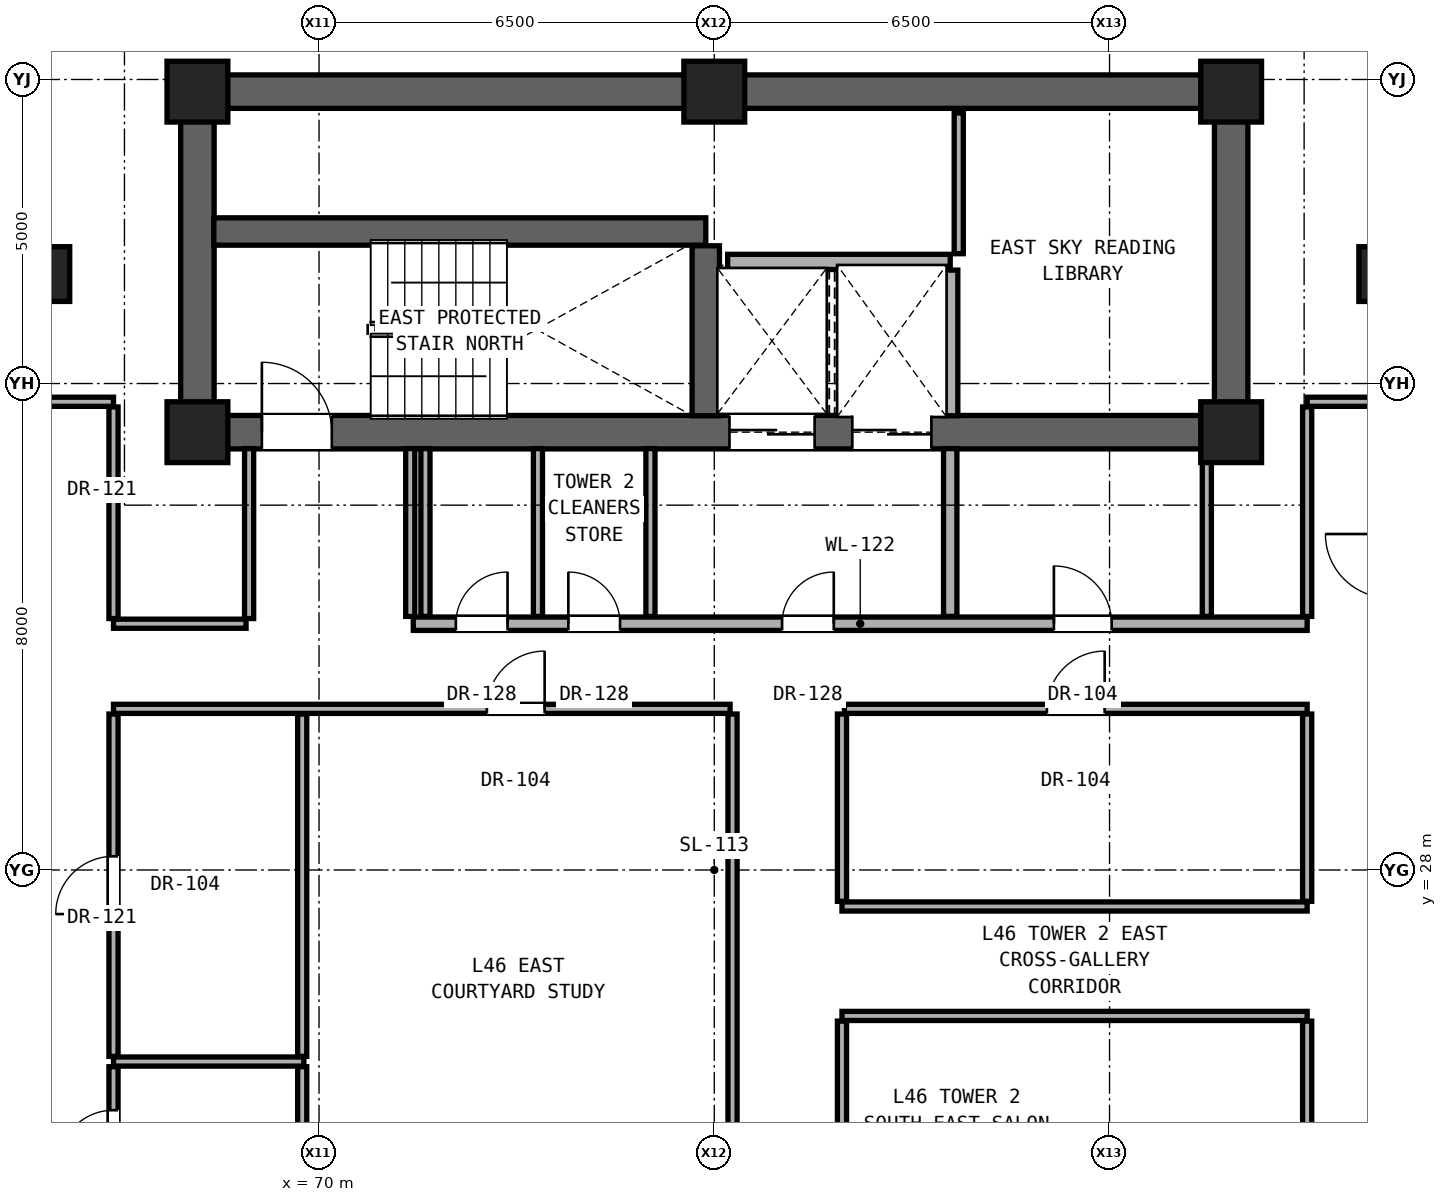
"""IFC4 building model, lengths in metres.
Left out: names, types, materials, properties, quantities, classifications, styles, units other than length and angle.
Written with IfcOpenShell. Run it as: python <this file> out.ifc"""

import sys

from ifc_helpers import new_model, si_unit, direction, frame, frame_2d, origin, origin_2d, place, context, subcontext, project, spatial, rectangle, extrude, element, fill, save


model = new_model("IFC4")
c1 = context("Model", 3, precision=1e-05, world=origin(), true_north=direction((0.0, 1.0)))
c2 = subcontext(c1, "Body", "Model", "MODEL_VIEW")
j1 = project(units=[si_unit("LENGTHUNIT", "METRE"), si_unit("PLANEANGLEUNIT", "RADIAN")], contexts=[c1])
p1 = place(None, origin())
s1 = spatial("IfcSite", under=j1, at=p1, CompositionType="ELEMENT")
p2 = place(p1, origin())
s2 = spatial("IfcBuilding", under=s1, at=p2, CompositionType="ELEMENT")
p3 = place(p2, frame((0.0, 0.0, 164.15)))
s3 = spatial("IfcBuildingStorey", under=s2, at=p3, CompositionType="ELEMENT", Elevation=164.15)
for number, where, z_axis, x_axis in (
    (1, (68.0, 35.2, 0.0), (0.0, 0.0, 1.0), (1.0, 0.0, 0.0)),
    (2, (85.0, 35.2, 0.0), (0.0, 0.0, 1.0), (1.0, 0.0, 0.0)),
    (3, (68.0, 40.8, 0.0), (0.0, 0.0, 1.0), (1.0, 0.0, 0.0)),
    (4, (76.5, 40.8, 0.0), (0.0, 0.0, 1.0), (1.0, 0.0, 0.0)),
    (5, (85.0, 40.8, 0.0), (0.0, 0.0, 1.0), (1.0, 0.0, 0.0)),
):
    element("IfcColumn", number, at=place(p3, frame(where, z_axis=z_axis, x_axis=x_axis)), inside=s3, PredefinedType="COLUMN", context=c2, shape_type="SweptSolid", body=[
        extrude(rectangle(XDim=1.0, YDim=1.0, at=origin_2d()), origin(), (0.0, 0.0, 1.0), 3.25),
    ])
for number, where, z_axis, x_axis in (
    (6, (65.6, 37.8, 0.0), (0.0, 0.0, 1.0), (1.0, 0.0, 0.0)),
    (7, (87.4, 37.8, 0.0), (0.0, 0.0, 1.0), (1.0, 0.0, 0.0)),
):
    element("IfcColumn", number, at=place(p3, frame(where, z_axis=z_axis, x_axis=x_axis)), inside=s3, PredefinedType="PILASTER", context=c2, shape_type="SweptSolid", body=[
        extrude(rectangle(XDim=0.6, YDim=0.9, at=origin_2d()), origin(), (0.0, 0.0, 1.0), 3.25),
    ])
p4 = place(p3, frame((68.0, 40.8, 0.0), z_axis=(0.0, 0.0, 1.0), x_axis=(1.0, 0.0, 0.0)))
e8 = element("IfcWall", 8, at=p4, inside=s3, PredefinedType="SHEAR", context=c2, shape_type="SweptSolid", body=[
    extrude(rectangle(XDim=17.0, YDim=0.55, at=frame_2d((8.5, 0.0))), origin(), (0.0, 0.0, 1.0), 3.05),
])
for number, where, z_axis, x_axis in (
    (9, (68.0, 35.2, 0.0), (0.0, 0.0, 1.0), (0.0, 1.0, 0.0)),
    (10, (85.0, 35.2, 0.0), (0.0, 0.0, 1.0), (0.0, 1.0, 0.0)),
):
    element("IfcWall", number, at=place(p3, frame(where, z_axis=z_axis, x_axis=x_axis)), inside=s3, PredefinedType="SHEAR", context=c2, shape_type="SweptSolid", body=[
        extrude(rectangle(XDim=5.6, YDim=0.55, at=frame_2d((2.8, 0.0))), origin(), (0.0, 0.0, 1.0), 3.05),
    ])
p5 = place(p3, frame((68.0, 35.2, 0.0), z_axis=(0.0, 0.0, 1.0), x_axis=(1.0, 0.0, 0.0)))
e11 = element("IfcWall", 11, at=p5, inside=s3, PredefinedType="SHEAR", context=c2, shape_type="SweptSolid", body=[
    extrude(rectangle(XDim=17.0, YDim=0.55, at=frame_2d((8.5, 0.0))), origin(), (0.0, 0.0, 1.0), 3.05),
])
p6 = place(p5, frame((1.06, 0.0, 0.0)))
e12 = element("IfcOpeningElement", 12, at=p6, cuts=e11, PredefinedType="OPENING", context=c2, shape_type="SweptSolid", body=[
    extrude(rectangle(XDim=1.15, YDim=2.2, at=frame_2d((0.575, 1.1))), frame((0.0, 0.285, 0.0), z_axis=(0.0, -1.0, 0.0), x_axis=(1.0, 0.0, 0.0)), (0.0, 0.0, 1.0), 0.57),
])
p7 = place(p5, frame((8.75, 0.0, 0.0)))
e13 = element("IfcOpeningElement", 13, at=p7, cuts=e11, PredefinedType="OPENING", context=c2, shape_type="SweptSolid", body=[
    extrude(rectangle(XDim=1.4, YDim=2.35, at=frame_2d((0.7, 1.175))), frame((0.0, 0.285, 0.0), z_axis=(0.0, -1.0, 0.0), x_axis=(1.0, 0.0, 0.0)), (0.0, 0.0, 1.0), 0.57),
])
p8 = place(p5, frame((10.77, 0.0, 0.0)))
e14 = element("IfcOpeningElement", 14, at=p8, cuts=e11, PredefinedType="OPENING", context=c2, shape_type="SweptSolid", body=[
    extrude(rectangle(XDim=1.3, YDim=2.3, at=frame_2d((0.65, 1.15))), frame((0.0, 0.285, 0.0), z_axis=(0.0, -1.0, 0.0), x_axis=(1.0, 0.0, 0.0)), (0.0, 0.0, 1.0), 0.57),
])
p9 = place(p3, frame((66.62, 24.85, 0.0), z_axis=(0.0, 0.0, 1.0), x_axis=(1.0, 0.0, 0.0)))
e15 = element("IfcWall", 15, at=p9, inside=s3, PredefinedType="PARTITIONING", context=c2, shape_type="SweptSolid", body=[
    extrude(rectangle(XDim=3.13, YDim=0.15, at=frame_2d((1.565, 0.0))), origin(), (0.0, 0.0, 1.0), 2.186),
])
for number, where, z_axis, x_axis in (
    (16, (78.6, 25.6, 0.0), (0.0, 0.0, 1.0), (1.0, 0.0, 0.0)),
    (17, (78.6, 27.4, 0.0), (0.0, 0.0, 1.0), (1.0, 0.0, 0.0)),
):
    element("IfcWall", number, at=place(p3, frame(where, z_axis=z_axis, x_axis=x_axis)), inside=s3, PredefinedType="PARTITIONING", context=c2, shape_type="SweptSolid", body=[
        extrude(rectangle(XDim=7.65, YDim=0.15, at=frame_2d((3.825, 0.0))), origin(), (0.0, 0.0, 1.0), 2.186),
    ])
p10 = place(p3, frame((66.62, 30.65, 0.0), z_axis=(0.0, 0.0, 1.0), x_axis=(1.0, 0.0, 0.0)))
e18 = element("IfcWall", 18, at=p10, inside=s3, PredefinedType="PARTITIONING", context=c2, shape_type="SweptSolid", body=[
    extrude(rectangle(XDim=10.14, YDim=0.15, at=frame_2d((5.07, 0.0))), origin(), (0.0, 0.0, 1.0), 2.186),
])
p11 = place(p10, frame((6.14, 0.0, 0.0)))
e19 = element("IfcOpeningElement", 19, at=p11, cuts=e18, PredefinedType="OPENING", context=c2, shape_type="SweptSolid", body=[
    extrude(rectangle(XDim=0.95, YDim=2.15, at=frame_2d((0.475, 1.075))), frame((0.0, 0.085, 0.0), z_axis=(0.0, -1.0, 0.0), x_axis=(1.0, 0.0, 0.0)), (0.0, 0.0, 1.0), 0.17),
])
p12 = place(p3, frame((78.64, 30.65, 0.0), z_axis=(0.0, 0.0, 1.0), x_axis=(1.0, 0.0, 0.0)))
e20 = element("IfcWall", 20, at=p12, inside=s3, PredefinedType="PARTITIONING", context=c2, shape_type="SweptSolid", body=[
    extrude(rectangle(XDim=7.61, YDim=0.15, at=frame_2d((3.805, 0.0))), origin(), (0.0, 0.0, 1.0), 2.186),
])
p13 = place(p12, frame((3.33, 0.0, 0.0)))
e21 = element("IfcOpeningElement", 21, at=p13, cuts=e20, PredefinedType="OPENING", context=c2, shape_type="SweptSolid", body=[
    extrude(rectangle(XDim=0.95, YDim=2.15, at=frame_2d((0.475, 1.075))), frame((0.0, 0.085, 0.0), z_axis=(0.0, -1.0, 0.0), x_axis=(1.0, 0.0, 0.0)), (0.0, 0.0, 1.0), 0.17),
])
p14 = place(p3, frame((66.62, 32.05, 0.0), z_axis=(0.0, 0.0, 1.0), x_axis=(1.0, 0.0, 0.0)))
e22 = element("IfcWall", 22, at=p14, inside=s3, PredefinedType="PARTITIONING", context=c2, shape_type="SweptSolid", body=[
    extrude(rectangle(XDim=2.18, YDim=0.15, at=frame_2d((1.09, 0.0))), origin(), (0.0, 0.0, 1.0), 2.186),
])
p15 = place(p3, frame((71.55, 32.05, 0.0), z_axis=(0.0, 0.0, 1.0), x_axis=(1.0, 0.0, 0.0)))
e23 = element("IfcWall", 23, at=p15, inside=s3, PredefinedType="SOLIDWALL", context=c2, shape_type="SweptSolid", body=[
    extrude(rectangle(XDim=14.7, YDim=0.22, at=frame_2d((7.35, 0.0))), origin(), (0.0, 0.0, 1.0), 2.186),
])
p16 = place(p15, frame((6.065, 0.0, 0.0)))
e24 = element("IfcOpeningElement", 24, at=p16, cuts=e23, PredefinedType="OPENING", context=c2, shape_type="SweptSolid", body=[
    extrude(rectangle(XDim=0.85, YDim=2.01, at=frame_2d((0.425, 1.005))), frame((0.0, 0.12, 0.0), z_axis=(0.0, -1.0, 0.0), x_axis=(1.0, 0.0, 0.0)), (0.0, 0.0, 1.0), 0.24),
])
p17 = place(p15, frame((10.535, 0.0, 0.0)))
e25 = element("IfcOpeningElement", 25, at=p17, cuts=e23, PredefinedType="OPENING", context=c2, shape_type="SweptSolid", body=[
    extrude(rectangle(XDim=0.95, YDim=2.15, at=frame_2d((0.475, 1.075))), frame((0.0, 0.12, 0.0), z_axis=(0.0, -1.0, 0.0), x_axis=(1.0, 0.0, 0.0)), (0.0, 0.0, 1.0), 0.24),
])
p18 = place(p15, frame((0.7, 0.0, 0.0)))
e26 = element("IfcOpeningElement", 26, at=p18, cuts=e23, PredefinedType="OPENING", context=c2, shape_type="SweptSolid", body=[
    extrude(rectangle(XDim=0.85, YDim=2.01, at=frame_2d((0.425, 1.005))), frame((0.0, 0.12, 0.0), z_axis=(0.0, -1.0, 0.0), x_axis=(1.0, 0.0, 0.0)), (0.0, 0.0, 1.0), 0.24),
])
p19 = place(p15, frame((2.55, 0.0, 0.0)))
e27 = element("IfcOpeningElement", 27, at=p19, cuts=e23, PredefinedType="OPENING", context=c2, shape_type="SweptSolid", body=[
    extrude(rectangle(XDim=0.85, YDim=2.01, at=frame_2d((0.425, 1.005))), frame((0.0, 0.12, 0.0), z_axis=(0.0, -1.0, 0.0), x_axis=(1.0, 0.0, 0.0)), (0.0, 0.0, 1.0), 0.24),
])
p20 = place(p3, frame((65.25, 35.7, 0.0), z_axis=(0.0, 0.0, 1.0), x_axis=(1.0, 0.0, 0.0)))
e28 = element("IfcWall", 28, at=p20, inside=s3, PredefinedType="PARTITIONING", context=c2, shape_type="SweptSolid", body=[
    extrude(rectangle(XDim=1.37, YDim=0.15, at=frame_2d((0.685, 0.0))), origin(), (0.0, 0.0, 1.0), 3.05),
])
p21 = place(p3, frame((86.25, 35.7, 0.0), z_axis=(0.0, 0.0, 1.0), x_axis=(1.0, 0.0, 0.0)))
e29 = element("IfcWall", 29, at=p21, inside=s3, PredefinedType="PARTITIONING", context=c2, shape_type="SweptSolid", body=[
    extrude(rectangle(XDim=1.35, YDim=0.15, at=frame_2d((0.675, 0.0))), origin(), (0.0, 0.0, 1.0), 3.05),
])
p22 = place(p3, frame((76.72, 38.0, 0.0), z_axis=(0.0, 0.0, 1.0), x_axis=(1.0, 0.0, 0.0)))
e30 = element("IfcWall", 30, at=p22, inside=s3, PredefinedType="SOLIDWALL", context=c2, shape_type="SweptSolid", body=[
    extrude(rectangle(XDim=3.66, YDim=0.25, at=frame_2d((1.83, 0.0))), origin(), (0.0, 0.0, 1.0), 3.05),
])
p23 = place(p3, frame((68.27, 38.5, 0.0), z_axis=(0.0, 0.0, 1.0), x_axis=(1.0, 0.0, 0.0)))
e31 = element("IfcWall", 31, at=p23, inside=s3, PredefinedType="SHEAR", context=c2, shape_type="SweptSolid", body=[
    extrude(rectangle(XDim=8.09, YDim=0.45, at=frame_2d((4.045, 0.0))), origin(), (0.0, 0.0, 1.0), 3.05),
])
p24 = place(p3, frame((66.62, 22.435, 0.0), z_axis=(0.0, 0.0, 1.0), x_axis=(0.0, 1.0, 0.0)))
e32 = element("IfcWall", 32, at=p24, inside=s3, PredefinedType="PARTITIONING", context=c2, shape_type="SweptSolid", body=[
    extrude(rectangle(XDim=2.33, YDim=0.15, at=frame_2d((1.165, 0.0))), origin(), (0.0, 0.0, 1.0), 3.05),
])
p25 = place(p24, frame((0.715, 0.0, 0.0)))
e33 = element("IfcOpeningElement", 33, at=p25, cuts=e32, PredefinedType="OPENING", context=c2, shape_type="SweptSolid", body=[
    extrude(rectangle(XDim=0.9, YDim=2.1, at=frame_2d((0.45, 1.05))), frame((0.0, 0.085, 0.0), z_axis=(0.0, -1.0, 0.0), x_axis=(1.0, 0.0, 0.0)), (0.0, 0.0, 1.0), 0.17),
])
p26 = place(p3, frame((66.62, 24.935, 0.0), z_axis=(0.0, 0.0, 1.0), x_axis=(0.0, 1.0, 0.0)))
e34 = element("IfcWall", 34, at=p26, inside=s3, PredefinedType="PARTITIONING", context=c2, shape_type="SweptSolid", body=[
    extrude(rectangle(XDim=5.63, YDim=0.15, at=frame_2d((2.815, 0.0))), origin(), (0.0, 0.0, 1.0), 2.346),
])
p27 = place(p26, frame((2.34, 0.0, 0.0)))
e35 = element("IfcOpeningElement", 35, at=p27, cuts=e34, PredefinedType="OPENING", context=c2, shape_type="SweptSolid", body=[
    extrude(rectangle(XDim=0.95, YDim=2.15, at=frame_2d((0.475, 1.075))), frame((0.0, 0.085, 0.0), z_axis=(0.0, -1.0, 0.0), x_axis=(1.0, 0.0, 0.0)), (0.0, 0.0, 1.0), 0.17),
])
p28 = place(p3, frame((66.62, 32.135, 0.0), z_axis=(0.0, 0.0, 1.0), x_axis=(0.0, 1.0, 0.0)))
e36 = element("IfcWall", 36, at=p28, inside=s3, PredefinedType="PARTITIONING", context=c2, shape_type="SweptSolid", body=[
    extrude(rectangle(XDim=3.48, YDim=0.15, at=frame_2d((1.74, 0.0))), origin(), (0.0, 0.0, 1.0), 2.442),
])
p29 = place(p3, frame((68.85, 32.135, 0.0), z_axis=(0.0, 0.0, 1.0), x_axis=(0.0, 1.0, 0.0)))
e37 = element("IfcWall", 37, at=p29, inside=s3, PredefinedType="PARTITIONING", context=c2, shape_type="SweptSolid", body=[
    extrude(rectangle(XDim=2.795, YDim=0.15, at=frame_2d((1.397, 0.0))), origin(), (0.0, 0.0, 1.0), 3.05),
])
p30 = place(p3, frame((69.723, 22.435, 0.0), z_axis=(0.0, 0.0, 1.0), x_axis=(0.0, 1.0, 0.0)))
e38 = element("IfcWall", 38, at=p30, inside=s3, PredefinedType="PARTITIONING", context=c2, shape_type="SweptSolid", body=[
    extrude(rectangle(XDim=2.33, YDim=0.15, at=frame_2d((1.165, 0.0))), origin(), (0.0, 0.0, 1.0), 3.05),
])
p31 = place(p3, frame((69.723, 24.935, 0.0), z_axis=(0.0, 0.0, 1.0), x_axis=(0.0, 1.0, 0.0)))
e39 = element("IfcWall", 39, at=p31, inside=s3, PredefinedType="PARTITIONING", context=c2, shape_type="SweptSolid", body=[
    extrude(rectangle(XDim=5.63, YDim=0.15, at=frame_2d((2.815, 0.0))), origin(), (0.0, 0.0, 1.0), 2.186),
])
for number, where, z_axis, x_axis in (
    (40, (71.5, 32.17, 0.0), (0.0, 0.0, 1.0), (0.0, 1.0, 0.0)),
    (41, (71.75, 32.17, 0.0), (0.0, 0.0, 1.0), (0.0, 1.0, 0.0)),
    (42, (73.6, 32.17, 0.0), (0.0, 0.0, 1.0), (0.0, 1.0, 0.0)),
    (43, (75.45, 32.17, 0.0), (0.0, 0.0, 1.0), (0.0, 1.0, 0.0)),
):
    element("IfcWall", number, at=place(p3, frame(where, z_axis=z_axis, x_axis=x_axis)), inside=s3, PredefinedType="PARTITIONING", context=c2, shape_type="SweptSolid", body=[
        extrude(rectangle(XDim=2.76, YDim=0.15, at=frame_2d((1.38, 0.0))), origin(), (0.0, 0.0, 1.0), 3.05),
    ])
p32 = place(p3, frame((76.36, 35.47, 0.0), z_axis=(0.0, 0.0, 1.0), x_axis=(0.0, 1.0, 0.0)))
e44 = element("IfcWall", 44, at=p32, inside=s3, PredefinedType="SHEAR", context=c2, shape_type="SweptSolid", body=[
    extrude(rectangle(XDim=2.795, YDim=0.45, at=frame_2d((1.397, 0.0))), origin(), (0.0, 0.0, 1.0), 3.05),
])
p33 = place(p3, frame((76.8, 22.435, 0.0), z_axis=(0.0, 0.0, 1.0), x_axis=(0.0, 1.0, 0.0)))
e45 = element("IfcWall", 45, at=p33, inside=s3, PredefinedType="PARTITIONING", context=c2, shape_type="SweptSolid", body=[
    extrude(rectangle(XDim=8.13, YDim=0.15, at=frame_2d((4.065, 0.0))), origin(), (0.0, 0.0, 1.0), 2.186),
])
p34 = place(p3, frame((78.6, 22.435, 0.0), z_axis=(0.0, 0.0, 1.0), x_axis=(0.0, 1.0, 0.0)))
e46 = element("IfcWall", 46, at=p34, inside=s3, PredefinedType="PARTITIONING", context=c2, shape_type="SweptSolid", body=[
    extrude(rectangle(XDim=3.08, YDim=0.15, at=frame_2d((1.54, 0.0))), origin(), (0.0, 0.0, 1.0), 3.05),
])
p35 = place(p3, frame((78.6, 27.485, 0.0), z_axis=(0.0, 0.0, 1.0), x_axis=(0.0, 1.0, 0.0)))
e47 = element("IfcWall", 47, at=p35, inside=s3, PredefinedType="PARTITIONING", context=c2, shape_type="SweptSolid", body=[
    extrude(rectangle(XDim=3.08, YDim=0.15, at=frame_2d((1.54, 0.0))), origin(), (0.0, 0.0, 1.0), 2.186),
])
p36 = place(p3, frame((80.38, 32.17, 0.0), z_axis=(0.0, 0.0, 1.0), x_axis=(0.0, 1.0, 0.0)))
e48 = element("IfcWall", 48, at=p36, inside=s3, PredefinedType="SOLIDWALL", context=c2, shape_type="SweptSolid", body=[
    extrude(rectangle(XDim=2.76, YDim=0.22, at=frame_2d((1.38, 0.0))), origin(), (0.0, 0.0, 1.0), 3.05),
])
p37 = place(p3, frame((80.38, 35.47, 0.0), z_axis=(0.0, 0.0, 1.0), x_axis=(0.0, 1.0, 0.0)))
e49 = element("IfcWall", 49, at=p37, inside=s3, PredefinedType="SOLIDWALL", context=c2, shape_type="SweptSolid", body=[
    extrude(rectangle(XDim=2.395, YDim=0.25, at=frame_2d((1.198, 0.0))), origin(), (0.0, 0.0, 1.0), 3.05),
])
p38 = place(p3, frame((80.52, 38.135, 0.0), z_axis=(0.0, 0.0, 1.0), x_axis=(0.0, 1.0, 0.0)))
e50 = element("IfcWall", 50, at=p38, inside=s3, PredefinedType="PARTITIONING", context=c2, shape_type="SweptSolid", body=[
    extrude(rectangle(XDim=2.315, YDim=0.15, at=frame_2d((1.157, 0.0))), origin(), (0.0, 0.0, 1.0), 3.05),
])
p39 = place(p3, frame((84.6, 32.17, 0.0), z_axis=(0.0, 0.0, 1.0), x_axis=(0.0, 1.0, 0.0)))
e51 = element("IfcWall", 51, at=p39, inside=s3, PredefinedType="PARTITIONING", context=c2, shape_type="SweptSolid", body=[
    extrude(rectangle(XDim=2.76, YDim=0.15, at=frame_2d((1.38, 0.0))), origin(), (0.0, 0.0, 1.0), 3.05),
])
p40 = place(p3, frame((86.25, 22.435, 0.0), z_axis=(0.0, 0.0, 1.0), x_axis=(0.0, 1.0, 0.0)))
e52 = element("IfcWall", 52, at=p40, inside=s3, PredefinedType="PARTITIONING", context=c2, shape_type="SweptSolid", body=[
    extrude(rectangle(XDim=3.08, YDim=0.15, at=frame_2d((1.54, 0.0))), origin(), (0.0, 0.0, 1.0), 3.05),
])
p41 = place(p3, frame((86.25, 27.485, 0.0), z_axis=(0.0, 0.0, 1.0), x_axis=(0.0, 1.0, 0.0)))
e53 = element("IfcWall", 53, at=p41, inside=s3, PredefinedType="PARTITIONING", context=c2, shape_type="SweptSolid", body=[
    extrude(rectangle(XDim=3.08, YDim=0.15, at=frame_2d((1.54, 0.0))), origin(), (0.0, 0.0, 1.0), 2.346),
])
p42 = place(p3, frame((86.25, 32.17, 0.0), z_axis=(0.0, 0.0, 1.0), x_axis=(0.0, 1.0, 0.0)))
e54 = element("IfcWall", 54, at=p42, inside=s3, PredefinedType="PARTITIONING", context=c2, shape_type="SweptSolid", body=[
    extrude(rectangle(XDim=3.445, YDim=0.15, at=frame_2d((1.723, 0.0))), origin(), (0.0, 0.0, 1.0), 2.442),
])
p43 = place(p6, origin())
e55 = element("IfcDoor", 55, at=p43, inside=s3, OperationType="SINGLE_SWING_LEFT", PredefinedType="DOOR", context=c2, shape_type="SweptSolid", body=[
    extrude(rectangle(XDim=1.15, YDim=2.2, at=frame_2d((0.575, 1.1))), frame((0.0, 0.025, 0.0), z_axis=(0.0, -1.0, 0.0), x_axis=(1.0, 0.0, 0.0)), (0.0, 0.0, 1.0), 0.05),
])
fill(e12, e55)
p44 = place(p16, origin())
e56 = element("IfcDoor", 56, at=p44, inside=s3, OperationType="SINGLE_SWING_RIGHT", PredefinedType="DOOR", context=c2, shape_type="SweptSolid", body=[
    extrude(rectangle(XDim=0.85, YDim=2.01, at=frame_2d((0.425, 1.005))), frame((0.0, 0.025, 0.0), z_axis=(0.0, -1.0, 0.0), x_axis=(1.0, 0.0, 0.0)), (0.0, 0.0, 1.0), 0.05),
])
fill(e24, e56)
p45 = place(p17, origin())
e57 = element("IfcDoor", 57, at=p45, inside=s3, OperationType="SINGLE_SWING_LEFT", PredefinedType="DOOR", context=c2, shape_type="SweptSolid", body=[
    extrude(rectangle(XDim=0.95, YDim=2.15, at=frame_2d((0.475, 1.075))), frame((0.0, 0.025, 0.0), z_axis=(0.0, -1.0, 0.0), x_axis=(1.0, 0.0, 0.0)), (0.0, 0.0, 1.0), 0.05),
])
fill(e25, e57)
p46 = place(p18, origin())
e58 = element("IfcDoor", 58, at=p46, inside=s3, OperationType="SINGLE_SWING_RIGHT", PredefinedType="DOOR", context=c2, shape_type="SweptSolid", body=[
    extrude(rectangle(XDim=0.85, YDim=2.01, at=frame_2d((0.425, 1.005))), frame((0.0, 0.025, 0.0), z_axis=(0.0, -1.0, 0.0), x_axis=(1.0, 0.0, 0.0)), (0.0, 0.0, 1.0), 0.05),
])
fill(e26, e58)
p47 = place(p19, origin())
e59 = element("IfcDoor", 59, at=p47, inside=s3, OperationType="SINGLE_SWING_LEFT", PredefinedType="DOOR", context=c2, shape_type="SweptSolid", body=[
    extrude(rectangle(XDim=0.85, YDim=2.01, at=frame_2d((0.425, 1.005))), frame((0.0, 0.025, 0.0), z_axis=(0.0, -1.0, 0.0), x_axis=(1.0, 0.0, 0.0)), (0.0, 0.0, 1.0), 0.05),
])
fill(e27, e59)
p48 = place(p25, origin())
e60 = element("IfcDoor", 60, at=p48, inside=s3, OperationType="SINGLE_SWING_LEFT", PredefinedType="DOOR", context=c2, shape_type="SweptSolid", body=[
    extrude(rectangle(XDim=0.9, YDim=2.1, at=frame_2d((0.45, 1.05))), frame((0.0, 0.025, 0.0), z_axis=(0.0, -1.0, 0.0), x_axis=(1.0, 0.0, 0.0)), (0.0, 0.0, 1.0), 0.05),
])
fill(e33, e60)
p49 = place(p27, origin())
e61 = element("IfcDoor", 61, at=p49, inside=s3, OperationType="SINGLE_SWING_LEFT", PredefinedType="DOOR", context=c2, shape_type="SweptSolid", body=[
    extrude(rectangle(XDim=0.95, YDim=2.15, at=frame_2d((0.475, 1.075))), frame((0.0, 0.025, 0.0), z_axis=(0.0, -1.0, 0.0), x_axis=(1.0, 0.0, 0.0)), (0.0, 0.0, 1.0), 0.05),
])
fill(e35, e61)
p50 = place(p11, origin())
e62 = element("IfcDoor", 62, at=p50, inside=s3, OperationType="SINGLE_SWING_RIGHT", PredefinedType="DOOR", context=c2, shape_type="SweptSolid", body=[
    extrude(rectangle(XDim=0.95, YDim=2.15, at=frame_2d((0.475, 1.075))), frame((0.0, 0.025, 0.0), z_axis=(0.0, -1.0, 0.0), x_axis=(1.0, 0.0, 0.0)), (0.0, 0.0, 1.0), 0.05),
])
fill(e19, e62)
p51 = place(p13, origin())
e63 = element("IfcDoor", 63, at=p51, inside=s3, OperationType="SINGLE_SWING_RIGHT", PredefinedType="DOOR", context=c2, shape_type="SweptSolid", body=[
    extrude(rectangle(XDim=0.95, YDim=2.15, at=frame_2d((0.475, 1.075))), frame((0.0, 0.025, 0.0), z_axis=(0.0, -1.0, 0.0), x_axis=(1.0, 0.0, 0.0)), (0.0, 0.0, 1.0), 0.05),
])
fill(e21, e63)
p52 = place(p7, origin())
e64 = element("IfcDoor", 64, at=p52, inside=s3, OperationType="DOUBLE_DOOR_SLIDING", PredefinedType="DOOR", context=c2, shape_type="SweptSolid", body=[
    extrude(rectangle(XDim=1.4, YDim=2.35, at=frame_2d((0.7, 1.175))), frame((0.0, 0.025, 0.0), z_axis=(0.0, -1.0, 0.0), x_axis=(1.0, 0.0, 0.0)), (0.0, 0.0, 1.0), 0.05),
])
fill(e13, e64)
p53 = place(p8, origin())
e65 = element("IfcDoor", 65, at=p53, inside=s3, OperationType="DOUBLE_DOOR_SLIDING", PredefinedType="DOOR", context=c2, shape_type="SweptSolid", body=[
    extrude(rectangle(XDim=1.3, YDim=2.3, at=frame_2d((0.65, 1.15))), frame((0.0, 0.025, 0.0), z_axis=(0.0, -1.0, 0.0), x_axis=(1.0, 0.0, 0.0)), (0.0, 0.0, 1.0), 0.05),
])
fill(e14, e65)
save(model, sys.argv[1])
